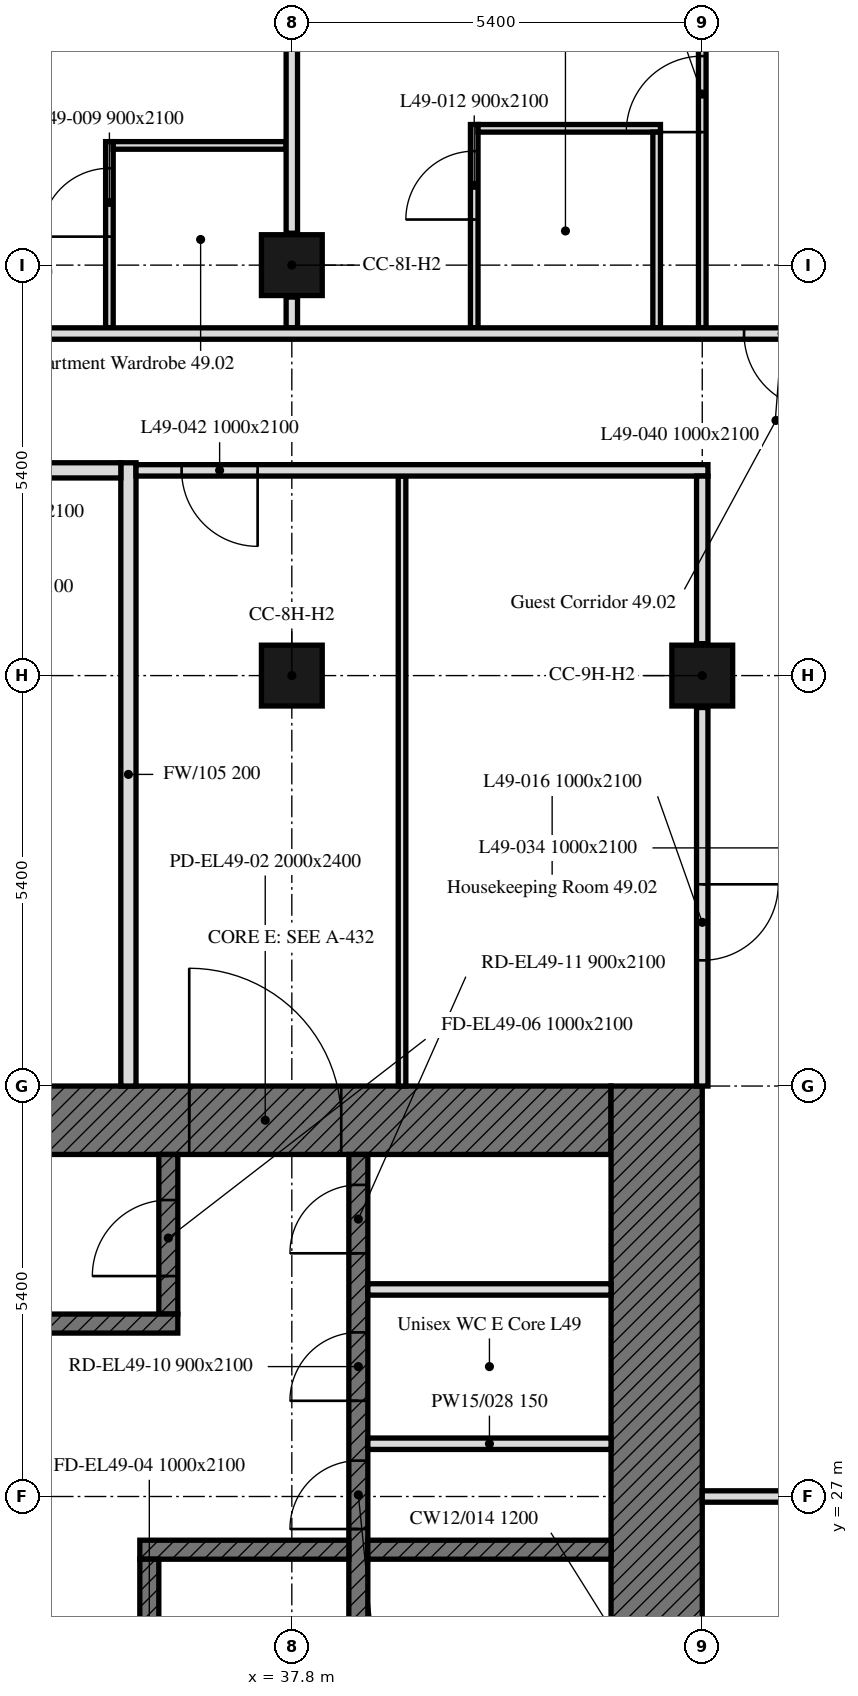
"""IFC4 building model, lengths in metres.
Left out: names, types, materials, properties, quantities, classifications, styles, units other than length and angle.
Written with IfcOpenShell. Run it as: python <this file> out.ifc"""

import sys

from ifc_helpers import new_model, si_unit, direction, frame, frame_2d, origin, origin_2d, place, context, subcontext, project, spatial, rectangle, extrude, element, fill, save


model = new_model("IFC4")
c1 = context("Model", 3, precision=1e-05, world=origin(), true_north=direction((0.0, 1.0)))
c2 = subcontext(c1, "Body", "Model", "MODEL_VIEW")
j1 = project(units=[si_unit("LENGTHUNIT", "METRE"), si_unit("PLANEANGLEUNIT", "RADIAN")], contexts=[c1])
p1 = place(None, origin())
s1 = spatial("IfcSite", under=j1, at=p1, CompositionType="ELEMENT")
p2 = place(p1, origin())
s2 = spatial("IfcBuilding", under=s1, at=p2, CompositionType="ELEMENT")
p3 = place(p2, frame((0.0, 0.0, 200.5)))
s3 = spatial("IfcBuildingStorey", under=s2, at=p3, CompositionType="ELEMENT", Elevation=200.5)
for number, where, z_axis, x_axis in (
    (1, (37.8, 37.8, 0.0), (0.0, 0.0, 1.0), (1.0, 0.0, 0.0)),
    (2, (43.2, 37.8, 0.0), (0.0, 0.0, 1.0), (1.0, 0.0, 0.0)),
    (3, (37.8, 43.2, 0.0), (0.0, 0.0, 1.0), (1.0, 0.0, 0.0)),
):
    element("IfcColumn", number, at=place(p3, frame(where, z_axis=z_axis, x_axis=x_axis)), inside=s3, PredefinedType="COLUMN", context=c2, shape_type="SweptSolid", body=[
        extrude(rectangle(XDim=0.8, YDim=0.8, at=origin_2d()), origin(), (0.0, 0.0, 1.0), 3.0),
    ])
p4 = place(p3, frame((47.901, 43.051, 0.0), z_axis=(0.0, 0.0, 1.0), x_axis=(-0.707106781187, 0.707106781187, 0.0)))
e4 = element("IfcWall", 4, at=p4, inside=s3, PredefinedType="SOLIDWALL", context=c2, shape_type="SweptSolid", body=[
    extrude(rectangle(XDim=6.86, YDim=0.3, at=frame_2d((3.43, 0.0))), origin(), (0.0, 0.0, 1.0), 3.0),
])
p5 = place(p4, frame((1.73, 0.0, 0.9)))
e5 = element("IfcOpeningElement", 5, at=p5, cuts=e4, PredefinedType="OPENING", context=c2, shape_type="SweptSolid", body=[
    extrude(rectangle(XDim=3.4, YDim=1.7, at=frame_2d((1.7, 0.85))), frame((0.0, 0.16, 0.0), z_axis=(0.0, -1.0, 0.0), x_axis=(1.0, 0.0, 0.0)), (0.0, 0.0, 1.0), 0.32),
])
p6 = place(p3, frame((30.9, 31.95, 0.0), z_axis=(0.0, 0.0, 1.0), x_axis=(1.0, 0.0, 0.0)))
e6 = element("IfcWall", 6, at=p6, inside=s3, PredefinedType="SOLIDWALL", context=c2, shape_type="SweptSolid", body=[
    extrude(rectangle(XDim=11.1, YDim=0.9, at=frame_2d((5.55, 0.0))), origin(), (0.0, 0.0, 1.0), 3.0),
])
p7 = place(p6, frame((5.55, 0.0, 0.0)))
e7 = element("IfcOpeningElement", 7, at=p7, cuts=e6, PredefinedType="OPENING", context=c2, shape_type="SweptSolid", body=[
    extrude(rectangle(XDim=2.0, YDim=2.4, at=frame_2d((1.0, 1.2))), frame((0.0, 0.45, 0.0), z_axis=(0.0, -1.0, 0.0), x_axis=(1.0, 0.0, 0.0)), (0.0, 0.0, 1.0), 0.9),
])
p8 = place(p3, frame((42.6, 32.4, 0.0), z_axis=(0.0, 0.0, 1.0), x_axis=(0.0, -1.0, 0.0)))
e8 = element("IfcWall", 8, at=p8, inside=s3, PredefinedType="SOLIDWALL", context=c2, shape_type="SweptSolid", body=[
    extrude(rectangle(XDim=16.2, YDim=1.2, at=frame_2d((8.1, 0.0))), origin(), (0.0, 0.0, 1.0), 3.0),
])
p9 = place(p3, frame((38.675, 17.1, 0.0), z_axis=(0.0, 0.0, 1.0), x_axis=(0.0, 1.0, 0.0)))
e9 = element("IfcWall", 9, at=p9, inside=s3, PredefinedType="SOLIDWALL", context=c2, shape_type="SweptSolid", body=[
    extrude(rectangle(XDim=14.4, YDim=0.25, at=frame_2d((7.2, 0.0))), origin(), (0.0, 0.0, 1.0), 3.0),
])
p10 = place(p9, frame((4.6, 0.0, 0.0)))
e10 = element("IfcOpeningElement", 10, at=p10, cuts=e9, PredefinedType="OPENING", context=c2, shape_type="SweptSolid", body=[
    extrude(rectangle(XDim=1.0, YDim=2.1, at=frame_2d((0.5, 1.05))), frame((0.0, 0.125, 0.0), z_axis=(0.0, -1.0, 0.0), x_axis=(1.0, 0.0, 0.0)), (0.0, 0.0, 1.0), 0.25),
])
p11 = place(p9, frame((7.062, 0.0, 0.0)))
e11 = element("IfcOpeningElement", 11, at=p11, cuts=e9, PredefinedType="OPENING", context=c2, shape_type="SweptSolid", body=[
    extrude(rectangle(XDim=1.2, YDim=2.1, at=frame_2d((0.6, 1.05))), frame((0.0, 0.125, 0.0), z_axis=(0.0, -1.0, 0.0), x_axis=(1.0, 0.0, 0.0)), (0.0, 0.0, 1.0), 0.25),
])
p12 = place(p9, frame((9.472, 0.0, 0.0)))
e12 = element("IfcOpeningElement", 12, at=p12, cuts=e9, PredefinedType="OPENING", context=c2, shape_type="SweptSolid", body=[
    extrude(rectangle(XDim=0.9, YDim=2.1, at=frame_2d((0.45, 1.05))), frame((0.0, 0.125, 0.0), z_axis=(0.0, -1.0, 0.0), x_axis=(1.0, 0.0, 0.0)), (0.0, 0.0, 1.0), 0.25),
])
p13 = place(p9, frame((11.159, 0.0, 0.0)))
e13 = element("IfcOpeningElement", 13, at=p13, cuts=e9, PredefinedType="OPENING", context=c2, shape_type="SweptSolid", body=[
    extrude(rectangle(XDim=0.9, YDim=2.1, at=frame_2d((0.45, 1.05))), frame((0.0, 0.125, 0.0), z_axis=(0.0, -1.0, 0.0), x_axis=(1.0, 0.0, 0.0)), (0.0, 0.0, 1.0), 0.25),
])
p14 = place(p9, frame((13.1, 0.0, 0.0)))
e14 = element("IfcOpeningElement", 14, at=p14, cuts=e9, PredefinedType="OPENING", context=c2, shape_type="SweptSolid", body=[
    extrude(rectangle(XDim=0.9, YDim=2.1, at=frame_2d((0.45, 1.05))), frame((0.0, 0.125, 0.0), z_axis=(0.0, -1.0, 0.0), x_axis=(1.0, 0.0, 0.0)), (0.0, 0.0, 1.0), 0.25),
])
p15 = place(p3, frame((38.8, 26.3, 0.0), z_axis=(0.0, 0.0, 1.0), x_axis=(1.0, 0.0, 0.0)))
e15 = element("IfcWall", 15, at=p15, inside=s3, PredefinedType="SOLIDWALL", context=c2, shape_type="SweptSolid", body=[
    extrude(rectangle(XDim=3.2, YDim=0.25, at=frame_2d((1.6, 0.0))), origin(), (0.0, 0.0, 1.0), 3.0),
])
p16 = place(p3, frame((35.8, 26.3, 0.0), z_axis=(0.0, 0.0, 1.0), x_axis=(1.0, 0.0, 0.0)))
e16 = element("IfcWall", 16, at=p16, inside=s3, PredefinedType="SOLIDWALL", context=c2, shape_type="SweptSolid", body=[
    extrude(rectangle(XDim=2.75, YDim=0.25, at=frame_2d((1.375, 0.0))), origin(), (0.0, 0.0, 1.0), 3.0),
])
p17 = place(p3, frame((36.175, 29.4, 0.0), z_axis=(0.0, 0.0, 1.0), x_axis=(0.0, 1.0, 0.0)))
e17 = element("IfcWall", 17, at=p17, inside=s3, PredefinedType="SOLIDWALL", context=c2, shape_type="SweptSolid", body=[
    extrude(rectangle(XDim=2.1, YDim=0.25, at=frame_2d((1.05, 0.0))), origin(), (0.0, 0.0, 1.0), 3.0),
])
p18 = place(p17, frame((0.5, 0.0, 0.0)))
e18 = element("IfcOpeningElement", 18, at=p18, cuts=e17, PredefinedType="OPENING", context=c2, shape_type="SweptSolid", body=[
    extrude(rectangle(XDim=1.0, YDim=2.1, at=frame_2d((0.5, 1.05))), frame((0.0, 0.125, 0.0), z_axis=(0.0, -1.0, 0.0), x_axis=(1.0, 0.0, 0.0)), (0.0, 0.0, 1.0), 0.25),
])
p19 = place(p3, frame((34.35, 29.275, 0.0), z_axis=(0.0, 0.0, 1.0), x_axis=(1.0, 0.0, 0.0)))
e19 = element("IfcWall", 19, at=p19, inside=s3, PredefinedType="SOLIDWALL", context=c2, shape_type="SweptSolid", body=[
    extrude(rectangle(XDim=1.95, YDim=0.25, at=frame_2d((0.975, 0.0))), origin(), (0.0, 0.0, 1.0), 3.0),
])
p20 = place(p3, frame((35.925, 20.55, 0.0), z_axis=(0.0, 0.0, 1.0), x_axis=(0.0, 1.0, 0.0)))
e20 = element("IfcWall", 20, at=p20, inside=s3, PredefinedType="SOLIDWALL", context=c2, shape_type="SweptSolid", body=[
    extrude(rectangle(XDim=5.625, YDim=0.25, at=frame_2d((2.812, 0.0))), origin(), (0.0, 0.0, 1.0), 3.0),
])
p21 = place(p20, frame((2.95, 0.0, 0.0)))
e21 = element("IfcOpeningElement", 21, at=p21, cuts=e20, PredefinedType="OPENING", context=c2, shape_type="SweptSolid", body=[
    extrude(rectangle(XDim=1.0, YDim=2.1, at=frame_2d((0.5, 1.05))), frame((0.0, 0.125, 0.0), z_axis=(0.0, -1.0, 0.0), x_axis=(1.0, 0.0, 0.0)), (0.0, 0.0, 1.0), 0.25),
])
for number, where, z_axis, x_axis in (
    (22, (38.8, 27.694, 0.0), (0.0, 0.0, 1.0), (1.0, 0.0, 0.0)),
    (23, (38.8, 29.724, 0.0), (0.0, 0.0, 1.0), (1.0, 0.0, 0.0)),
):
    element("IfcWall", number, at=place(p3, frame(where, z_axis=z_axis, x_axis=x_axis)), inside=s3, PredefinedType="PARTITIONING", context=c2, shape_type="SweptSolid", body=[
        extrude(rectangle(XDim=3.2, YDim=0.15, at=frame_2d((1.6, 0.0))), origin(), (0.0, 0.0, 1.0), 3.0),
    ])
p22 = place(p3, frame((35.4, 42.375, 0.0), z_axis=(0.0, 0.0, 1.0), x_axis=(0.0, 1.0, 0.0)))
e24 = element("IfcWall", 24, at=p22, inside=s3, PredefinedType="PARTITIONING", context=c2, shape_type="SweptSolid", body=[
    extrude(rectangle(XDim=2.45, YDim=0.1, at=frame_2d((1.225, 0.0))), origin(), (0.0, 0.0, 1.0), 3.0),
])
p23 = place(p22, frame((1.2, 0.0, 0.0)))
e25 = element("IfcOpeningElement", 25, at=p23, cuts=e24, PredefinedType="OPENING", context=c2, shape_type="SweptSolid", body=[
    extrude(rectangle(XDim=0.9, YDim=2.1, at=frame_2d((0.45, 1.05))), frame((0.0, 0.05, 0.0), z_axis=(0.0, -1.0, 0.0), x_axis=(1.0, 0.0, 0.0)), (0.0, 0.0, 1.0), 0.1),
])
p24 = place(p3, frame((35.45, 44.775, 0.0), z_axis=(0.0, 0.0, 1.0), x_axis=(1.0, 0.0, 0.0)))
e26 = element("IfcWall", 26, at=p24, inside=s3, PredefinedType="PARTITIONING", context=c2, shape_type="SweptSolid", body=[
    extrude(rectangle(XDim=2.275, YDim=0.1, at=frame_2d((1.138, 0.0))), origin(), (0.0, 0.0, 1.0), 3.0),
])
p25 = place(p3, frame((37.8, 42.375, 0.0), z_axis=(0.0, 0.0, 1.0), x_axis=(0.0, 1.0, 0.0)))
e27 = element("IfcWall", 27, at=p25, inside=s3, PredefinedType="PARTITIONING", context=c2, shape_type="SweptSolid", body=[
    extrude(rectangle(XDim=0.405, YDim=0.15, at=frame_2d((0.203, 0.0))), origin(), (0.0, 0.0, 1.0), 2.4),
])
p26 = place(p3, frame((37.8, 43.62, 0.0), z_axis=(0.0, 0.0, 1.0), x_axis=(0.0, 1.0, 0.0)))
e28 = element("IfcWall", 28, at=p26, inside=s3, PredefinedType="PARTITIONING", context=c2, shape_type="SweptSolid", body=[
    extrude(rectangle(XDim=4.229, YDim=0.15, at=frame_2d((2.115, 0.0))), origin(), (0.0, 0.0, 1.0), 2.4),
])
p27 = place(p3, frame((40.2, 42.375, 0.0), z_axis=(0.0, 0.0, 1.0), x_axis=(0.0, 1.0, 0.0)))
e29 = element("IfcWall", 29, at=p27, inside=s3, PredefinedType="PARTITIONING", context=c2, shape_type="SweptSolid", body=[
    extrude(rectangle(XDim=2.675, YDim=0.1, at=frame_2d((1.337, 0.0))), origin(), (0.0, 0.0, 1.0), 3.0),
])
p28 = place(p27, frame((1.425, 0.0, 0.0)))
e30 = element("IfcOpeningElement", 30, at=p28, cuts=e29, PredefinedType="OPENING", context=c2, shape_type="SweptSolid", body=[
    extrude(rectangle(XDim=0.9, YDim=2.1, at=frame_2d((0.45, 1.05))), frame((0.0, 0.05, 0.0), z_axis=(0.0, -1.0, 0.0), x_axis=(1.0, 0.0, 0.0)), (0.0, 0.0, 1.0), 0.1),
])
p29 = place(p3, frame((40.25, 45.0, 0.0), z_axis=(0.0, 0.0, 1.0), x_axis=(1.0, 0.0, 0.0)))
e31 = element("IfcWall", 31, at=p29, inside=s3, PredefinedType="PARTITIONING", context=c2, shape_type="SweptSolid", body=[
    extrude(rectangle(XDim=2.4, YDim=0.1, at=frame_2d((1.2, 0.0))), origin(), (0.0, 0.0, 1.0), 3.0),
])
p30 = place(p3, frame((42.6, 44.95, 0.0), z_axis=(0.0, 0.0, 1.0), x_axis=(0.0, -1.0, 0.0)))
e32 = element("IfcWall", 32, at=p30, inside=s3, PredefinedType="PARTITIONING", context=c2, shape_type="SweptSolid", body=[
    extrude(rectangle(XDim=2.575, YDim=0.1, at=frame_2d((1.288, 0.0))), origin(), (0.0, 0.0, 1.0), 3.0),
])
p31 = place(p3, frame((43.2, 42.375, 0.0), z_axis=(0.0, 0.0, 1.0), x_axis=(0.0, 1.0, 0.0)))
e33 = element("IfcWall", 33, at=p31, inside=s3, PredefinedType="PARTITIONING", context=c2, shape_type="SweptSolid", body=[
    extrude(rectangle(XDim=5.113, YDim=0.1, at=frame_2d((2.556, 0.0))), origin(), (0.0, 0.0, 1.0), 3.0),
])
p32 = place(p31, frame((2.575, 0.0, 0.0)))
e34 = element("IfcOpeningElement", 34, at=p32, cuts=e33, PredefinedType="OPENING", context=c2, shape_type="SweptSolid", body=[
    extrude(rectangle(XDim=1.0, YDim=2.1, at=frame_2d((0.5, 1.05))), frame((0.0, 0.05, 0.0), z_axis=(0.0, -1.0, 0.0), x_axis=(1.0, 0.0, 0.0)), (0.0, 0.0, 1.0), 0.1),
])
p33 = place(p3, frame((47.849, 42.3, 0.0), z_axis=(0.0, 0.0, 1.0), x_axis=(-1.0, 0.0, 0.0)))
e35 = element("IfcWall", 35, at=p33, inside=s3, PredefinedType="PARTITIONING", context=c2, shape_type="SweptSolid", body=[
    extrude(rectangle(XDim=41.698, YDim=0.15, at=frame_2d((20.849, 0.0))), origin(), (0.0, 0.0, 1.0), 2.4),
])
p34 = place(p33, frame((39.566, 0.0, 0.0)))
e36 = element("IfcOpeningElement", 36, at=p34, cuts=e35, PredefinedType="OPENING", context=c2, shape_type="SweptSolid", body=[
    extrude(rectangle(XDim=1.0, YDim=2.1, at=frame_2d((0.5, 1.05))), frame((0.0, 0.075, 0.0), z_axis=(0.0, -1.0, 0.0), x_axis=(1.0, 0.0, 0.0)), (0.0, 0.0, 1.0), 0.15),
])
p35 = place(p33, frame((3.099, 0.0, 0.0)))
e37 = element("IfcOpeningElement", 37, at=p35, cuts=e35, PredefinedType="OPENING", context=c2, shape_type="SweptSolid", body=[
    extrude(rectangle(XDim=1.0, YDim=2.1, at=frame_2d((0.5, 1.05))), frame((0.0, 0.075, 0.0), z_axis=(0.0, -1.0, 0.0), x_axis=(1.0, 0.0, 0.0)), (0.0, 0.0, 1.0), 0.15),
])
p36 = place(p33, frame((28.249, 0.0, 0.0)))
e38 = element("IfcOpeningElement", 38, at=p36, cuts=e35, PredefinedType="OPENING", context=c2, shape_type="SweptSolid", body=[
    extrude(rectangle(XDim=1.0, YDim=2.1, at=frame_2d((0.5, 1.05))), frame((0.0, 0.075, 0.0), z_axis=(0.0, -1.0, 0.0), x_axis=(1.0, 0.0, 0.0)), (0.0, 0.0, 1.0), 0.15),
])
p37 = place(p33, frame((17.449, 0.0, 0.0)))
e39 = element("IfcOpeningElement", 39, at=p37, cuts=e35, PredefinedType="OPENING", context=c2, shape_type="SweptSolid", body=[
    extrude(rectangle(XDim=1.0, YDim=2.1, at=frame_2d((0.5, 1.05))), frame((0.0, 0.075, 0.0), z_axis=(0.0, -1.0, 0.0), x_axis=(1.0, 0.0, 0.0)), (0.0, 0.0, 1.0), 0.15),
])
p38 = place(p3, frame((35.65, 40.6, 0.0), z_axis=(0.0, 0.0, 1.0), x_axis=(0.0, -1.0, 0.0)))
e40 = element("IfcWall", 40, at=p38, inside=s3, PredefinedType="PARTITIONING", context=c2, shape_type="SweptSolid", body=[
    extrude(rectangle(XDim=8.2, YDim=0.2, at=frame_2d((4.1, 0.0))), origin(), (0.0, 0.0, 1.0), 2.4),
])
p39 = place(p3, frame((39.25, 32.4, 0.0), z_axis=(0.0, 0.0, 1.0), x_axis=(0.0, 1.0, 0.0)))
e41 = element("IfcWall", 41, at=p39, inside=s3, PredefinedType="PARTITIONING", context=c2, shape_type="SweptSolid", body=[
    extrude(rectangle(XDim=8.025, YDim=0.1, at=frame_2d((4.013, 0.0))), origin(), (0.0, 0.0, 1.0), 2.4),
])
p40 = place(p3, frame((43.2, 27.0, 0.0), z_axis=(0.0, 0.0, 1.0), x_axis=(1.0, 0.0, 0.0)))
e42 = element("IfcWall", 42, at=p40, inside=s3, PredefinedType="PARTITIONING", context=c2, shape_type="SweptSolid", body=[
    extrude(rectangle(XDim=2.025, YDim=0.15, at=frame_2d((1.013, 0.0))), origin(), (0.0, 0.0, 1.0), 2.4),
])
p41 = place(p3, frame((32.5, 40.5, 0.0), z_axis=(0.0, 0.0, 1.0), x_axis=(1.0, 0.0, 0.0)))
e43 = element("IfcWall", 43, at=p41, inside=s3, PredefinedType="PARTITIONING", context=c2, shape_type="SweptSolid", body=[
    extrude(rectangle(XDim=3.05, YDim=0.2, at=frame_2d((1.525, 0.0))), origin(), (0.0, 0.0, 1.0), 3.0),
])
p42 = place(p41, frame((1.025, 0.0, 0.0)))
e44 = element("IfcOpeningElement", 44, at=p42, cuts=e43, PredefinedType="OPENING", context=c2, shape_type="SweptSolid", body=[
    extrude(rectangle(XDim=1.0, YDim=2.1, at=frame_2d((0.5, 1.05))), frame((0.0, 0.1, 0.0), z_axis=(0.0, -1.0, 0.0), x_axis=(1.0, 0.0, 0.0)), (0.0, 0.0, 1.0), 0.2),
])
p43 = place(p3, frame((43.275, 40.5, 0.0), z_axis=(0.0, 0.0, 1.0), x_axis=(-1.0, 0.0, 0.0)))
e45 = element("IfcWall", 45, at=p43, inside=s3, PredefinedType="PARTITIONING", context=c2, shape_type="SweptSolid", body=[
    extrude(rectangle(XDim=7.525, YDim=0.15, at=frame_2d((3.762, 0.0))), origin(), (0.0, 0.0, 1.0), 2.4),
])
p44 = place(p43, frame((5.925, 0.0, 0.0)))
e46 = element("IfcOpeningElement", 46, at=p44, cuts=e45, PredefinedType="OPENING", context=c2, shape_type="SweptSolid", body=[
    extrude(rectangle(XDim=1.0, YDim=2.1, at=frame_2d((0.5, 1.05))), frame((0.0, 0.075, 0.0), z_axis=(0.0, -1.0, 0.0), x_axis=(1.0, 0.0, 0.0)), (0.0, 0.0, 1.0), 0.15),
])
p45 = place(p3, frame((43.2, 40.425, 0.0), z_axis=(0.0, 0.0, 1.0), x_axis=(0.0, -1.0, 0.0)))
e47 = element("IfcWall", 47, at=p45, inside=s3, PredefinedType="PARTITIONING", context=c2, shape_type="SweptSolid", body=[
    extrude(rectangle(XDim=2.205, YDim=0.15, at=frame_2d((1.103, 0.0))), origin(), (0.0, 0.0, 1.0), 3.0),
])
p46 = place(p3, frame((43.2, 37.38, 0.0), z_axis=(0.0, 0.0, 1.0), x_axis=(0.0, -1.0, 0.0)))
e48 = element("IfcWall", 48, at=p46, inside=s3, PredefinedType="PARTITIONING", context=c2, shape_type="SweptSolid", body=[
    extrude(rectangle(XDim=4.98, YDim=0.15, at=frame_2d((2.49, 0.0))), origin(), (0.0, 0.0, 1.0), 3.0),
])
p47 = place(p46, frame((2.326, 0.0, 0.0)))
e49 = element("IfcOpeningElement", 49, at=p47, cuts=e48, PredefinedType="OPENING", context=c2, shape_type="SweptSolid", body=[
    extrude(rectangle(XDim=1.0, YDim=2.1, at=frame_2d((0.5, 1.05))), frame((0.0, 0.075, 0.0), z_axis=(0.0, -1.0, 0.0), x_axis=(1.0, 0.0, 0.0)), (0.0, 0.0, 1.0), 0.15),
])
p48 = place(p7, origin())
e50 = element("IfcDoor", 50, at=p48, inside=s3, OperationType="DOUBLE_DOOR_SINGLE_SWING", PredefinedType="DOOR", context=c2, shape_type="SweptSolid", body=[
    extrude(rectangle(XDim=2.0, YDim=2.4, at=frame_2d((1.0, 1.2))), frame((0.0, 0.025, 0.0), z_axis=(0.0, -1.0, 0.0), x_axis=(1.0, 0.0, 0.0)), (0.0, 0.0, 1.0), 0.05),
])
fill(e7, e50)
p49 = place(p18, origin())
e51 = element("IfcDoor", 51, at=p49, inside=s3, OperationType="SINGLE_SWING_LEFT", PredefinedType="DOOR", context=c2, shape_type="SweptSolid", body=[
    extrude(rectangle(XDim=1.0, YDim=2.1, at=frame_2d((0.5, 1.05))), frame((0.0, 0.025, 0.0), z_axis=(0.0, -1.0, 0.0), x_axis=(1.0, 0.0, 0.0)), (0.0, 0.0, 1.0), 0.05),
])
fill(e18, e51)
p50 = place(p12, origin())
e52 = element("IfcDoor", 52, at=p50, inside=s3, OperationType="SINGLE_SWING_LEFT", PredefinedType="DOOR", context=c2, shape_type="SweptSolid", body=[
    extrude(rectangle(XDim=0.9, YDim=2.1, at=frame_2d((0.45, 1.05))), frame((0.0, 0.025, 0.0), z_axis=(0.0, -1.0, 0.0), x_axis=(1.0, 0.0, 0.0)), (0.0, 0.0, 1.0), 0.05),
])
fill(e12, e52)
p51 = place(p13, origin())
e53 = element("IfcDoor", 53, at=p51, inside=s3, OperationType="SINGLE_SWING_LEFT", PredefinedType="DOOR", context=c2, shape_type="SweptSolid", body=[
    extrude(rectangle(XDim=0.9, YDim=2.1, at=frame_2d((0.45, 1.05))), frame((0.0, 0.025, 0.0), z_axis=(0.0, -1.0, 0.0), x_axis=(1.0, 0.0, 0.0)), (0.0, 0.0, 1.0), 0.05),
])
fill(e13, e53)
p52 = place(p14, origin())
e54 = element("IfcDoor", 54, at=p52, inside=s3, OperationType="SINGLE_SWING_LEFT", PredefinedType="DOOR", context=c2, shape_type="SweptSolid", body=[
    extrude(rectangle(XDim=0.9, YDim=2.1, at=frame_2d((0.45, 1.05))), frame((0.0, 0.025, 0.0), z_axis=(0.0, -1.0, 0.0), x_axis=(1.0, 0.0, 0.0)), (0.0, 0.0, 1.0), 0.05),
])
fill(e14, e54)
p53 = place(p23, origin())
e55 = element("IfcDoor", 55, at=p53, inside=s3, OperationType="SINGLE_SWING_LEFT", PredefinedType="DOOR", context=c2, shape_type="SweptSolid", body=[
    extrude(rectangle(XDim=0.9, YDim=2.1, at=frame_2d((0.45, 1.05))), frame((0.0, 0.025, 0.0), z_axis=(0.0, -1.0, 0.0), x_axis=(1.0, 0.0, 0.0)), (0.0, 0.0, 1.0), 0.05),
])
fill(e25, e55)
p54 = place(p28, origin())
e56 = element("IfcDoor", 56, at=p54, inside=s3, OperationType="SINGLE_SWING_RIGHT", PredefinedType="DOOR", context=c2, shape_type="SweptSolid", body=[
    extrude(rectangle(XDim=0.9, YDim=2.1, at=frame_2d((0.45, 1.05))), frame((0.0, 0.025, 0.0), z_axis=(0.0, -1.0, 0.0), x_axis=(1.0, 0.0, 0.0)), (0.0, 0.0, 1.0), 0.05),
])
fill(e30, e56)
p55 = place(p47, origin())
e57 = element("IfcDoor", 57, at=p55, inside=s3, OperationType="SINGLE_SWING_RIGHT", PredefinedType="DOOR", context=c2, shape_type="SweptSolid", body=[
    extrude(rectangle(XDim=1.0, YDim=2.1, at=frame_2d((0.5, 1.05))), frame((0.0, 0.025, 0.0), z_axis=(0.0, -1.0, 0.0), x_axis=(1.0, 0.0, 0.0)), (0.0, 0.0, 1.0), 0.05),
])
fill(e49, e57)
p56 = place(p32, origin())
e58 = element("IfcDoor", 58, at=p56, inside=s3, OperationType="SINGLE_SWING_RIGHT", PredefinedType="DOOR", context=c2, shape_type="SweptSolid", body=[
    extrude(rectangle(XDim=1.0, YDim=2.1, at=frame_2d((0.5, 1.05))), frame((0.0, 0.025, 0.0), z_axis=(0.0, -1.0, 0.0), x_axis=(1.0, 0.0, 0.0)), (0.0, 0.0, 1.0), 0.05),
])
fill(e34, e58)
p57 = place(p35, origin())
e59 = element("IfcDoor", 59, at=p57, inside=s3, OperationType="SINGLE_SWING_RIGHT", PredefinedType="DOOR", context=c2, shape_type="SweptSolid", body=[
    extrude(rectangle(XDim=1.0, YDim=2.1, at=frame_2d((0.5, 1.05))), frame((0.0, 0.025, 0.0), z_axis=(0.0, -1.0, 0.0), x_axis=(1.0, 0.0, 0.0)), (0.0, 0.0, 1.0), 0.05),
])
fill(e37, e59)
p58 = place(p44, origin())
e60 = element("IfcDoor", 60, at=p58, inside=s3, OperationType="SINGLE_SWING_LEFT", PredefinedType="DOOR", context=c2, shape_type="SweptSolid", body=[
    extrude(rectangle(XDim=1.0, YDim=2.1, at=frame_2d((0.5, 1.05))), frame((0.0, 0.025, 0.0), z_axis=(0.0, -1.0, 0.0), x_axis=(1.0, 0.0, 0.0)), (0.0, 0.0, 1.0), 0.05),
])
fill(e46, e60)
save(model, sys.argv[1])
